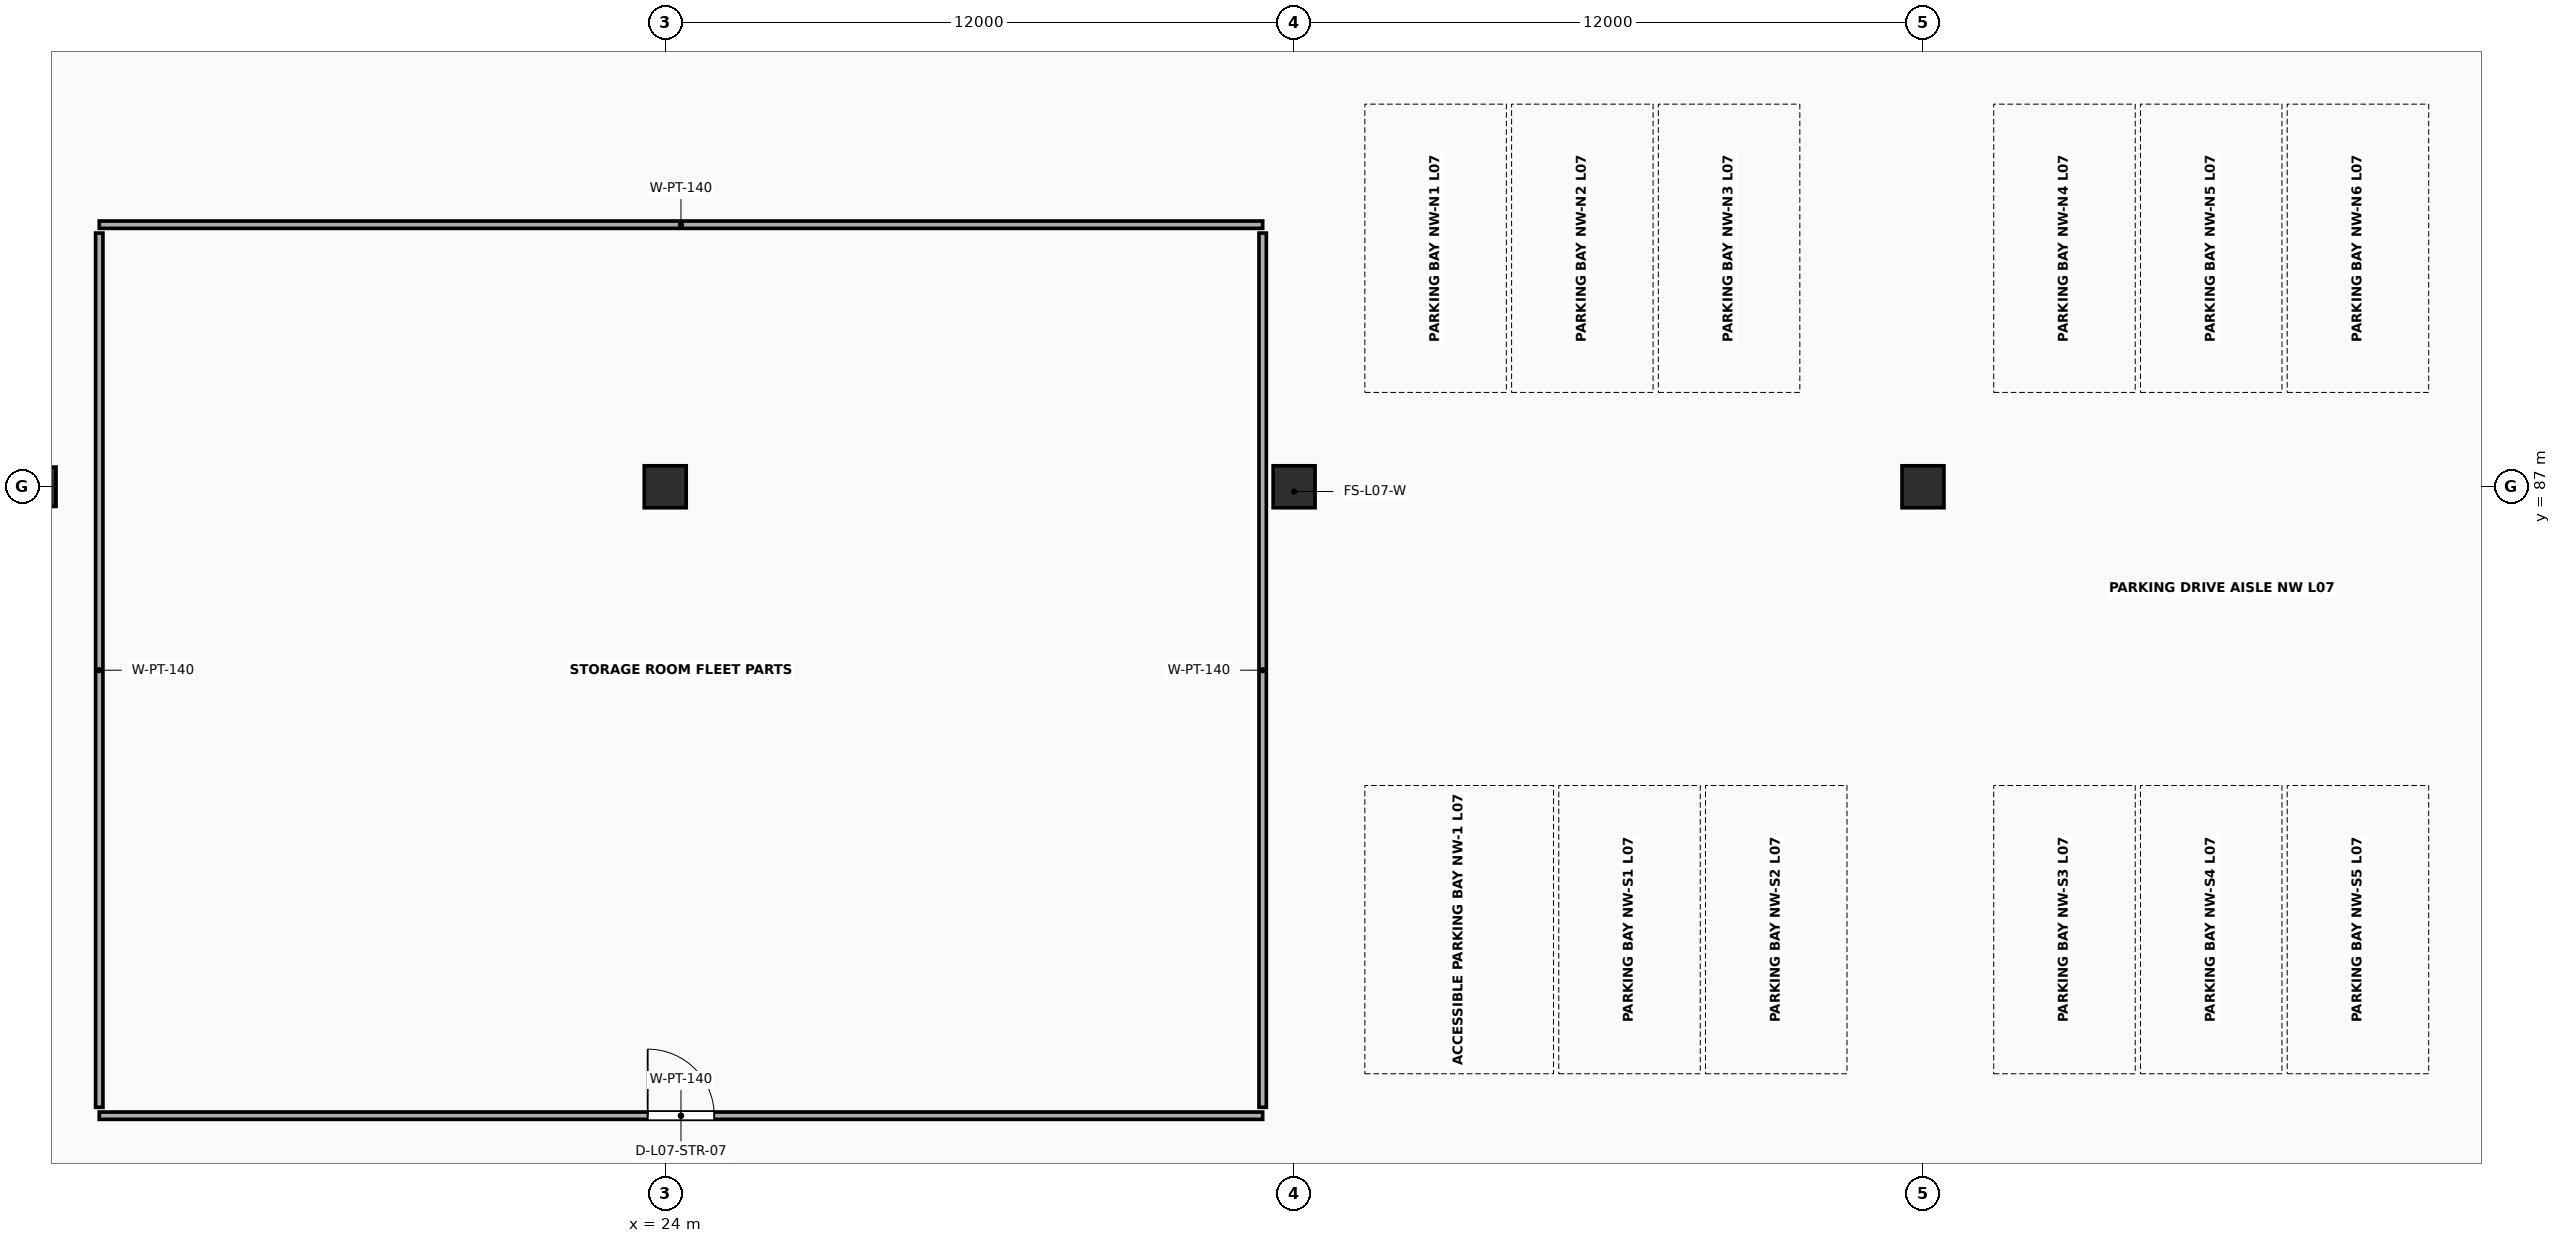
"""IFC4 building model, lengths in metres.
Left out: names, types, materials, properties, quantities, classifications, styles, units other than length and angle.
Written with IfcOpenShell. Run it as: python <this file> out.ifc"""

import sys

from ifc_helpers import new_model, si_unit, direction, frame, frame_2d, origin, origin_2d, place, context, subcontext, project, spatial, rectangle, extrude, element, fill, save


model = new_model("IFC4")
c1 = context("Model", 3, precision=1e-05, world=origin(), true_north=direction((0.0, 1.0)))
c2 = subcontext(c1, "Body", "Model", "MODEL_VIEW")
j1 = project(units=[si_unit("LENGTHUNIT", "METRE"), si_unit("PLANEANGLEUNIT", "RADIAN")], contexts=[c1])
p1 = place(None, origin())
s1 = spatial("IfcSite", under=j1, at=p1, CompositionType="ELEMENT")
p2 = place(p1, origin())
s2 = spatial("IfcBuilding", under=s1, at=p2, CompositionType="ELEMENT")
p3 = place(p2, frame((0.0, 0.0, 28.6)))
s3 = spatial("IfcBuildingStorey", under=s2, at=p3, CompositionType="ELEMENT", Elevation=28.6)
p4 = place(p3, frame((12.0, 87.0, 0.0), z_axis=(0.0, 0.0, 1.0), x_axis=(1.0, 0.0, 0.0)))
e1 = element("IfcColumn", 1, at=p4, inside=s3, PredefinedType="COLUMN", context=c2, shape_type="SweptSolid", body=[
    extrude(rectangle(XDim=0.75, YDim=0.75, at=origin_2d()), origin(), (0.0, 0.0, 1.0), 3.8),
])
for number, where, z_axis, x_axis in (
    (2, (24.0, 87.0, 0.0), (0.0, 0.0, 1.0), (1.0, 0.0, 0.0)),
    (3, (36.0, 87.0, 0.0), (0.0, 0.0, 1.0), (1.0, 0.0, 0.0)),
    (4, (48.0, 87.0, 0.0), (0.0, 0.0, 1.0), (1.0, 0.0, 0.0)),
):
    element("IfcColumn", number, at=place(p3, frame(where, z_axis=z_axis, x_axis=x_axis)), inside=s3, PredefinedType="COLUMN", context=c2, shape_type="SweptSolid", body=[
        extrude(rectangle(XDim=0.8, YDim=0.8, at=origin_2d()), origin(), (0.0, 0.0, 1.0), 3.8),
    ])
p5 = place(p3, frame((13.2, 75.0, 0.0), z_axis=(0.0, 0.0, 1.0), x_axis=(1.0, 0.0, 0.0)))
e5 = element("IfcWall", 5, at=p5, inside=s3, PredefinedType="PARTITIONING", context=c2, shape_type="SweptSolid", body=[
    extrude(rectangle(XDim=22.2, YDim=0.14, at=frame_2d((11.1, 0.0))), origin(), (0.0, 0.0, 1.0), 2.64),
])
p6 = place(p5, frame((10.465, 0.0, 0.0)))
e6 = element("IfcOpeningElement", 6, at=p6, cuts=e5, PredefinedType="OPENING", context=c2, shape_type="SweptSolid", body=[
    extrude(rectangle(XDim=1.27, YDim=2.27, at=frame_2d((0.635, 1.135))), frame((0.0, 0.085, 0.0), z_axis=(0.0, -1.0, 0.0), x_axis=(1.0, 0.0, 0.0)), (0.0, 0.0, 1.0), 0.17),
])
p7 = place(p3, frame((13.2, 92.0, 0.0), z_axis=(0.0, 0.0, 1.0), x_axis=(1.0, 0.0, 0.0)))
e7 = element("IfcWall", 7, at=p7, inside=s3, PredefinedType="PARTITIONING", context=c2, shape_type="SweptSolid", body=[
    extrude(rectangle(XDim=22.2, YDim=0.14, at=frame_2d((11.1, 0.0))), origin(), (0.0, 0.0, 1.0), 2.64),
])
for number, where, z_axis, x_axis in (
    (8, (13.2, 75.16, 0.0), (0.0, 0.0, 1.0), (0.0, 1.0, 0.0)),
    (9, (35.4, 75.16, 0.0), (0.0, 0.0, 1.0), (0.0, 1.0, 0.0)),
):
    element("IfcWall", number, at=place(p3, frame(where, z_axis=z_axis, x_axis=x_axis)), inside=s3, PredefinedType="PARTITIONING", context=c2, shape_type="SweptSolid", body=[
        extrude(rectangle(XDim=16.68, YDim=0.14, at=frame_2d((8.34, 0.0))), origin(), (0.0, 0.0, 1.0), 2.64),
    ])
p8 = place(p6, origin())
e10 = element("IfcDoor", 10, at=p8, inside=s3, OperationType="SINGLE_SWING_LEFT", PredefinedType="DOOR", context=c2, shape_type="SweptSolid", body=[
    extrude(rectangle(XDim=1.27, YDim=2.27, at=frame_2d((0.635, 1.135))), frame((0.0, 0.025, 0.0), z_axis=(0.0, -1.0, 0.0), x_axis=(1.0, 0.0, 0.0)), (0.0, 0.0, 1.0), 0.05),
])
fill(e6, e10)
save(model, sys.argv[1])
